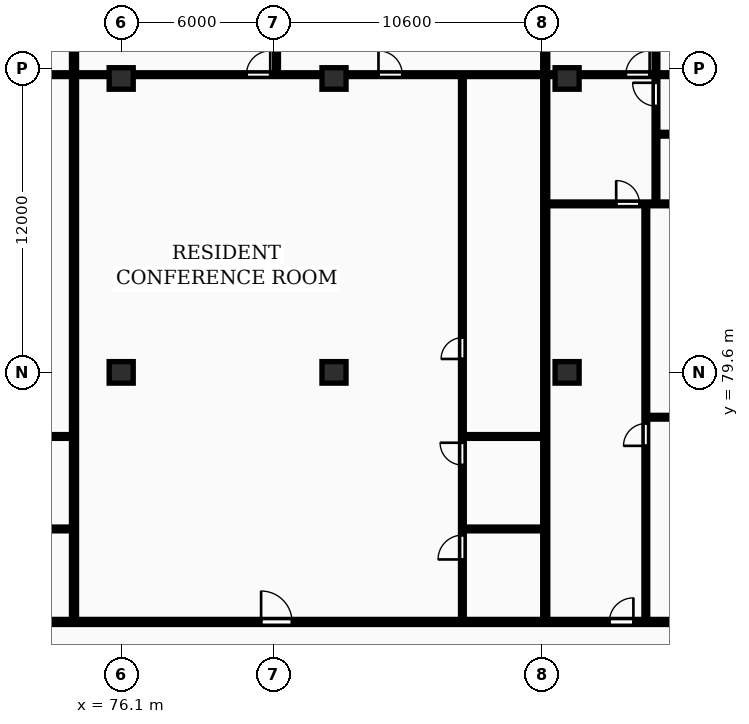
"""IFC4 building model, lengths in metres.
Left out: names, types, materials, properties, quantities, classifications, styles, units other than length and angle.
Written with IfcOpenShell. Run it as: python <this file> out.ifc"""

import sys

from ifc_helpers import new_model, si_unit, direction, frame, frame_2d, origin, origin_2d, place, context, subcontext, project, spatial, rectangle, extrude, element, fill, save


model = new_model("IFC4")
c1 = context("Model", 3, precision=1e-05, world=origin(), true_north=direction((0.0, 1.0)))
c2 = subcontext(c1, "Body", "Model", "MODEL_VIEW")
j1 = project(units=[si_unit("LENGTHUNIT", "METRE"), si_unit("PLANEANGLEUNIT", "RADIAN")], contexts=[c1])
p1 = place(None, origin())
s1 = spatial("IfcSite", under=j1, at=p1, CompositionType="ELEMENT")
p2 = place(p1, origin())
s2 = spatial("IfcBuilding", under=s1, at=p2, CompositionType="ELEMENT")
p3 = place(p2, frame((0.0, 0.0, 132.8)))
s3 = spatial("IfcBuildingStorey", under=s2, at=p3, CompositionType="ELEMENT", Elevation=132.8)
for number, where, z_axis, x_axis in (
    (1, (76.1, 79.6, 0.0), (0.0, 0.0, 1.0), (1.0, 0.0, 0.0)),
    (2, (76.1, 91.2, 0.0), (0.0, 0.0, 1.0), (1.0, 0.0, 0.0)),
    (3, (84.5, 79.6, 0.0), (0.0, 0.0, 1.0), (1.0, 0.0, 0.0)),
    (4, (84.5, 91.2, 0.0), (0.0, 0.0, 1.0), (1.0, 0.0, 0.0)),
    (5, (93.7, 79.6, 0.0), (0.0, 0.0, 1.0), (1.0, 0.0, 0.0)),
    (6, (93.7, 91.2, 0.0), (0.0, 0.0, 1.0), (1.0, 0.0, 0.0)),
):
    element("IfcColumn", number, at=place(p3, frame(where, z_axis=z_axis, x_axis=x_axis)), inside=s3, PredefinedType="COLUMN", context=c2, shape_type="SweptSolid", body=[
        extrude(rectangle(XDim=0.95, YDim=0.85, at=origin_2d()), origin(), (0.0, 0.0, 1.0), 3.25),
    ])
p4 = place(p3, frame((74.238, 69.83, 0.0), z_axis=(0.0, 0.0, 1.0), x_axis=(0.0, 1.0, 0.0)))
e7 = element("IfcWall", 7, at=p4, inside=s3, PredefinedType="PARTITIONING", context=c2, shape_type="SweptSolid", body=[
    extrude(rectangle(XDim=26.07, YDim=0.2, at=frame_2d((13.035, 0.0))), origin(), (0.0, 0.0, 1.0), 2.97),
])
for number, where, z_axis, x_axis in (
    (8, (70.798, 73.42, 0.0), (0.0, 0.0, 1.0), (1.0, 0.0, 0.0)),
    (9, (70.798, 77.07, 0.0), (0.0, 0.0, 1.0), (1.0, 0.0, 0.0)),
):
    element("IfcWall", number, at=place(p3, frame(where, z_axis=z_axis, x_axis=x_axis)), inside=s3, PredefinedType="PARTITIONING", context=c2, shape_type="SweptSolid", body=[
        extrude(rectangle(XDim=3.36, YDim=0.15, at=frame_2d((1.68, 0.0))), origin(), (0.0, 0.0, 1.0), 2.97),
    ])
p5 = place(p3, frame((57.68, 91.35, 0.0), z_axis=(0.0, 0.0, 1.0), x_axis=(1.0, 0.0, 0.0)))
e10 = element("IfcWall", 10, at=p5, inside=s3, PredefinedType="PARTITIONING", context=c2, shape_type="SweptSolid", body=[
    extrude(rectangle(XDim=16.478, YDim=0.15, at=frame_2d((8.239, 0.0))), origin(), (0.0, 0.0, 1.0), 2.663),
])
p6 = place(p5, frame((5.629, 0.0, 0.0)))
e11 = element("IfcOpeningElement", 11, at=p6, cuts=e10, PredefinedType="OPENING", context=c2, shape_type="SweptSolid", body=[
    extrude(rectangle(XDim=0.94, YDim=2.1, at=frame_2d((0.47, 1.05))), frame((0.0, 0.085, 0.0), z_axis=(0.0, -1.0, 0.0), x_axis=(1.0, 0.0, 0.0)), (0.0, 0.0, 1.0), 0.17),
])
p7 = place(p5, frame((7.645, 0.0, 0.0)))
e12 = element("IfcOpeningElement", 12, at=p7, cuts=e10, PredefinedType="OPENING", context=c2, shape_type="SweptSolid", body=[
    extrude(rectangle(XDim=0.94, YDim=2.1, at=frame_2d((0.47, 1.05))), frame((0.0, 0.085, 0.0), z_axis=(0.0, -1.0, 0.0), x_axis=(1.0, 0.0, 0.0)), (0.0, 0.0, 1.0), 0.17),
])
p8 = place(p3, frame((92.837, 69.83, 0.0), z_axis=(0.0, 0.0, 1.0), x_axis=(0.0, 1.0, 0.0)))
e13 = element("IfcWall", 13, at=p8, inside=s3, PredefinedType="PARTITIONING", context=c2, shape_type="SweptSolid", body=[
    extrude(rectangle(XDim=26.07, YDim=0.2, at=frame_2d((13.035, 0.0))), origin(), (0.0, 0.0, 1.0), 2.97),
])
for number, where, z_axis, x_axis in (
    (14, (89.627, 73.42, 0.0), (0.0, 0.0, 1.0), (1.0, 0.0, 0.0)),
    (15, (89.627, 77.07, 0.0), (0.0, 0.0, 1.0), (1.0, 0.0, 0.0)),
):
    element("IfcWall", number, at=place(p3, frame(where, z_axis=z_axis, x_axis=x_axis)), inside=s3, PredefinedType="PARTITIONING", context=c2, shape_type="SweptSolid", body=[
        extrude(rectangle(XDim=3.13, YDim=0.15, at=frame_2d((1.565, 0.0))), origin(), (0.0, 0.0, 1.0), 2.97),
    ])
p9 = place(p3, frame((89.567, 69.81, 0.0), z_axis=(0.0, 0.0, 1.0), x_axis=(0.0, 1.0, 0.0)))
e16 = element("IfcWall", 16, at=p9, inside=s3, PredefinedType="PARTITIONING", context=c2, shape_type="SweptSolid", body=[
    extrude(rectangle(XDim=21.48, YDim=0.15, at=frame_2d((10.74, 0.0))), origin(), (0.0, 0.0, 1.0), 2.97),
])
p10 = place(p9, frame((2.406, 0.0, 0.0)))
e17 = element("IfcOpeningElement", 17, at=p10, cuts=e16, PredefinedType="OPENING", context=c2, shape_type="SweptSolid", body=[
    extrude(rectangle(XDim=0.96, YDim=2.1, at=frame_2d((0.48, 1.05))), frame((0.0, 0.085, 0.0), z_axis=(0.0, -1.0, 0.0), x_axis=(1.0, 0.0, 0.0)), (0.0, 0.0, 1.0), 0.17),
])
p11 = place(p9, frame((6.133, 0.0, 0.0)))
e18 = element("IfcOpeningElement", 18, at=p11, cuts=e16, PredefinedType="OPENING", context=c2, shape_type="SweptSolid", body=[
    extrude(rectangle(XDim=0.88, YDim=2.06, at=frame_2d((0.44, 1.03))), frame((0.0, 0.085, 0.0), z_axis=(0.0, -1.0, 0.0), x_axis=(1.0, 0.0, 0.0)), (0.0, 0.0, 1.0), 0.17),
])
p12 = place(p9, frame((10.32, 0.0, 0.0)))
e19 = element("IfcOpeningElement", 19, at=p12, cuts=e16, PredefinedType="OPENING", context=c2, shape_type="SweptSolid", body=[
    extrude(rectangle(XDim=0.84, YDim=2.04, at=frame_2d((0.42, 1.02))), frame((0.0, 0.085, 0.0), z_axis=(0.0, -1.0, 0.0), x_axis=(1.0, 0.0, 0.0)), (0.0, 0.0, 1.0), 0.17),
])
p13 = place(p3, frame((82.232, 91.43, 0.0), z_axis=(0.0, 0.0, 1.0), x_axis=(0.0, 1.0, 0.0)))
e20 = element("IfcWall", 20, at=p13, inside=s3, PredefinedType="PARTITIONING", context=c2, shape_type="SweptSolid", body=[
    extrude(rectangle(XDim=4.47, YDim=0.15, at=frame_2d((2.235, 0.0))), origin(), (0.0, 0.0, 1.0), 2.97),
])
p14 = place(p3, frame((74.317, 91.35, 0.0), z_axis=(0.0, 0.0, 1.0), x_axis=(1.0, 0.0, 0.0)))
e21 = element("IfcWall", 21, at=p14, inside=s3, PredefinedType="PARTITIONING", context=c2, shape_type="SweptSolid", body=[
    extrude(rectangle(XDim=18.44, YDim=0.15, at=frame_2d((9.22, 0.0))), origin(), (0.0, 0.0, 1.0), 2.663),
])
p15 = place(p14, frame((6.725, 0.0, 0.0)))
e22 = element("IfcOpeningElement", 22, at=p15, cuts=e21, PredefinedType="OPENING", context=c2, shape_type="SweptSolid", body=[
    extrude(rectangle(XDim=0.94, YDim=2.1, at=frame_2d((0.47, 1.05))), frame((0.0, 0.085, 0.0), z_axis=(0.0, -1.0, 0.0), x_axis=(1.0, 0.0, 0.0)), (0.0, 0.0, 1.0), 0.17),
])
p16 = place(p14, frame((11.938, 0.0, 0.0)))
e23 = element("IfcOpeningElement", 23, at=p16, cuts=e21, PredefinedType="OPENING", context=c2, shape_type="SweptSolid", body=[
    extrude(rectangle(XDim=0.94, YDim=2.1, at=frame_2d((0.47, 1.05))), frame((0.0, 0.085, 0.0), z_axis=(0.0, -1.0, 0.0), x_axis=(1.0, 0.0, 0.0)), (0.0, 0.0, 1.0), 0.17),
])
p17 = place(p3, frame((96.867, 77.83, 0.0), z_axis=(0.0, 0.0, 1.0), x_axis=(1.0, 0.0, 0.0)))
e24 = element("IfcWall", 24, at=p17, inside=s3, PredefinedType="PARTITIONING", context=c2, shape_type="SweptSolid", body=[
    extrude(rectangle(XDim=16.177, YDim=0.15, at=frame_2d((8.089, 0.0))), origin(), (0.0, 0.0, 1.0), 2.97),
])
p18 = place(p17, frame((3.45, 0.0, 0.0)))
e25 = element("IfcOpeningElement", 25, at=p18, cuts=e24, PredefinedType="OPENING", context=c2, shape_type="SweptSolid", body=[
    extrude(rectangle(XDim=0.88, YDim=2.06, at=frame_2d((0.44, 1.03))), frame((0.0, 0.085, 0.0), z_axis=(0.0, -1.0, 0.0), x_axis=(1.0, 0.0, 0.0)), (0.0, 0.0, 1.0), 0.17),
])
p19 = place(p3, frame((96.808, 69.81, 0.0), z_axis=(0.0, 0.0, 1.0), x_axis=(0.0, 1.0, 0.0)))
e26 = element("IfcWall", 26, at=p19, inside=s3, PredefinedType="PARTITIONING", context=c2, shape_type="SweptSolid", body=[
    extrude(rectangle(XDim=16.4, YDim=0.15, at=frame_2d((8.2, 0.0))), origin(), (0.0, 0.0, 1.0), 2.97),
])
p20 = place(p19, frame((6.89, 0.0, 0.0)))
e27 = element("IfcOpeningElement", 27, at=p20, cuts=e26, PredefinedType="OPENING", context=c2, shape_type="SweptSolid", body=[
    extrude(rectangle(XDim=0.88, YDim=2.06, at=frame_2d((0.44, 1.03))), frame((0.0, 0.085, 0.0), z_axis=(0.0, -1.0, 0.0), x_axis=(1.0, 0.0, 0.0)), (0.0, 0.0, 1.0), 0.17),
])
p21 = place(p3, frame((97.208, 86.29, 0.0), z_axis=(0.0, 0.0, 1.0), x_axis=(0.0, 1.0, 0.0)))
e28 = element("IfcWall", 28, at=p21, inside=s3, PredefinedType="PARTITIONING", context=c2, shape_type="SweptSolid", body=[
    extrude(rectangle(XDim=9.61, YDim=0.15, at=frame_2d((4.805, 0.0))), origin(), (0.0, 0.0, 1.0), 2.97),
])
p22 = place(p21, frame((3.82, 0.0, 0.0)))
e29 = element("IfcOpeningElement", 29, at=p22, cuts=e28, PredefinedType="OPENING", context=c2, shape_type="SweptSolid", body=[
    extrude(rectangle(XDim=0.92, YDim=2.08, at=frame_2d((0.46, 1.04))), frame((0.0, 0.085, 0.0), z_axis=(0.0, -1.0, 0.0), x_axis=(1.0, 0.0, 0.0)), (0.0, 0.0, 1.0), 0.17),
])
p23 = place(p3, frame((97.248, 89.0, 0.0), z_axis=(0.0, 0.0, 1.0), x_axis=(1.0, 0.0, 0.0)))
e30 = element("IfcWall", 30, at=p23, inside=s3, PredefinedType="PARTITIONING", context=c2, shape_type="SweptSolid", body=[
    extrude(rectangle(XDim=15.797, YDim=0.15, at=frame_2d((7.899, 0.0))), origin(), (0.0, 0.0, 1.0), 2.97),
])
p24 = place(p23, frame((1.191, 0.0, 0.0)))
e31 = element("IfcOpeningElement", 31, at=p24, cuts=e30, PredefinedType="OPENING", context=c2, shape_type="SweptSolid", body=[
    extrude(rectangle(XDim=0.84, YDim=2.04, at=frame_2d((0.42, 1.02))), frame((0.0, 0.085, 0.0), z_axis=(0.0, -1.0, 0.0), x_axis=(1.0, 0.0, 0.0)), (0.0, 0.0, 1.0), 0.17),
])
p25 = place(p23, frame((7.479, 0.0, 0.0)))
e32 = element("IfcOpeningElement", 32, at=p25, cuts=e30, PredefinedType="OPENING", context=c2, shape_type="SweptSolid", body=[
    extrude(rectangle(XDim=0.84, YDim=2.04, at=frame_2d((0.42, 1.02))), frame((0.0, 0.085, 0.0), z_axis=(0.0, -1.0, 0.0), x_axis=(1.0, 0.0, 0.0)), (0.0, 0.0, 1.0), 0.17),
])
p26 = place(p23, frame((11.798, 0.0, 0.0)))
e33 = element("IfcOpeningElement", 33, at=p26, cuts=e30, PredefinedType="OPENING", context=c2, shape_type="SweptSolid", body=[
    extrude(rectangle(XDim=0.84, YDim=2.04, at=frame_2d((0.42, 1.02))), frame((0.0, 0.085, 0.0), z_axis=(0.0, -1.0, 0.0), x_axis=(1.0, 0.0, 0.0)), (0.0, 0.0, 1.0), 0.17),
])
p27 = place(p3, frame((92.917, 86.25, 0.0), z_axis=(0.0, 0.0, 1.0), x_axis=(1.0, 0.0, 0.0)))
e34 = element("IfcWall", 34, at=p27, inside=s3, PredefinedType="PARTITIONING", context=c2, shape_type="SweptSolid", body=[
    extrude(rectangle(XDim=20.127, YDim=0.15, at=frame_2d((10.064, 0.0))), origin(), (0.0, 0.0, 1.0), 2.97),
])
p28 = place(p27, frame((2.72, 0.0, 0.0)))
e35 = element("IfcOpeningElement", 35, at=p28, cuts=e34, PredefinedType="OPENING", context=c2, shape_type="SweptSolid", body=[
    extrude(rectangle(XDim=0.92, YDim=2.08, at=frame_2d((0.46, 1.04))), frame((0.0, 0.085, 0.0), z_axis=(0.0, -1.0, 0.0), x_axis=(1.0, 0.0, 0.0)), (0.0, 0.0, 1.0), 0.17),
])
p29 = place(p3, frame((92.917, 91.35, 0.0), z_axis=(0.0, 0.0, 1.0), x_axis=(1.0, 0.0, 0.0)))
e36 = element("IfcWall", 36, at=p29, inside=s3, PredefinedType="PARTITIONING", context=c2, shape_type="SweptSolid", body=[
    extrude(rectangle(XDim=15.877, YDim=0.15, at=frame_2d((7.939, 0.0))), origin(), (0.0, 0.0, 1.0), 2.663),
])
p30 = place(p29, frame((3.1, 0.0, 0.0)))
e37 = element("IfcOpeningElement", 37, at=p30, cuts=e36, PredefinedType="OPENING", context=c2, shape_type="SweptSolid", body=[
    extrude(rectangle(XDim=0.94, YDim=2.1, at=frame_2d((0.47, 1.05))), frame((0.0, 0.085, 0.0), z_axis=(0.0, -1.0, 0.0), x_axis=(1.0, 0.0, 0.0)), (0.0, 0.0, 1.0), 0.17),
])
p31 = place(p29, frame((7.373, 0.0, 0.0)))
e38 = element("IfcOpeningElement", 38, at=p31, cuts=e36, PredefinedType="OPENING", context=c2, shape_type="SweptSolid", body=[
    extrude(rectangle(XDim=0.88, YDim=2.06, at=frame_2d((0.44, 1.03))), frame((0.0, 0.085, 0.0), z_axis=(0.0, -1.0, 0.0), x_axis=(1.0, 0.0, 0.0)), (0.0, 0.0, 1.0), 0.17),
])
p32 = place(p29, frame((11.646, 0.0, 0.0)))
e39 = element("IfcOpeningElement", 39, at=p32, cuts=e36, PredefinedType="OPENING", context=c2, shape_type="SweptSolid", body=[
    extrude(rectangle(XDim=0.88, YDim=2.06, at=frame_2d((0.44, 1.03))), frame((0.0, 0.085, 0.0), z_axis=(0.0, -1.0, 0.0), x_axis=(1.0, 0.0, 0.0)), (0.0, 0.0, 1.0), 0.17),
])
p33 = place(p3, frame((57.6, 69.75, 0.0), z_axis=(0.0, 0.0, 1.0), x_axis=(1.0, 0.0, 0.0)))
e40 = element("IfcWall", 40, at=p33, inside=s3, PredefinedType="PARTITIONING", context=c2, shape_type="SweptSolid", body=[
    extrude(rectangle(XDim=73.0, YDim=0.2, at=frame_2d((36.5, 0.0))), origin(), (0.0, 0.0, 1.0), 2.97),
])
p34 = place(p33, frame((6.629, 0.0, 0.0)))
e41 = element("IfcOpeningElement", 41, at=p34, cuts=e40, PredefinedType="OPENING", context=c2, shape_type="SweptSolid", body=[
    extrude(rectangle(XDim=1.22, YDim=2.18, at=frame_2d((0.61, 1.09))), frame((0.0, 0.11, 0.0), z_axis=(0.0, -1.0, 0.0), x_axis=(1.0, 0.0, 0.0)), (0.0, 0.0, 1.0), 0.22),
])
p35 = place(p33, frame((24.022, 0.0, 0.0)))
e42 = element("IfcOpeningElement", 42, at=p35, cuts=e40, PredefinedType="OPENING", context=c2, shape_type="SweptSolid", body=[
    extrude(rectangle(XDim=1.22, YDim=2.18, at=frame_2d((0.61, 1.09))), frame((0.0, 0.11, 0.0), z_axis=(0.0, -1.0, 0.0), x_axis=(1.0, 0.0, 0.0)), (0.0, 0.0, 1.0), 0.22),
])
p36 = place(p33, frame((37.768, 0.0, 0.0)))
e43 = element("IfcOpeningElement", 43, at=p36, cuts=e40, PredefinedType="OPENING", context=c2, shape_type="SweptSolid", body=[
    extrude(rectangle(XDim=0.95, YDim=2.15, at=frame_2d((0.475, 1.075))), frame((0.0, 0.11, 0.0), z_axis=(0.0, -1.0, 0.0), x_axis=(1.0, 0.0, 0.0)), (0.0, 0.0, 1.0), 0.22),
])
p37 = place(p33, frame((57.57, 0.0, 0.0)))
e44 = element("IfcOpeningElement", 44, at=p37, cuts=e40, PredefinedType="OPENING", context=c2, shape_type="SweptSolid", body=[
    extrude(rectangle(XDim=0.95, YDim=2.15, at=frame_2d((0.475, 1.075))), frame((0.0, 0.11, 0.0), z_axis=(0.0, -1.0, 0.0), x_axis=(1.0, 0.0, 0.0)), (0.0, 0.0, 1.0), 0.22),
])
p38 = place(p10, origin())
e45 = element("IfcDoor", 45, at=p38, inside=s3, OperationType="SINGLE_SWING_LEFT", PredefinedType="DOOR", context=c2, shape_type="SweptSolid", body=[
    extrude(rectangle(XDim=0.96, YDim=2.1, at=frame_2d((0.48, 1.05))), frame((0.0, 0.025, 0.0), z_axis=(0.0, -1.0, 0.0), x_axis=(1.0, 0.0, 0.0)), (0.0, 0.0, 1.0), 0.05),
])
fill(e17, e45)
p39 = place(p11, origin())
e46 = element("IfcDoor", 46, at=p39, inside=s3, OperationType="SINGLE_SWING_RIGHT", PredefinedType="DOOR", context=c2, shape_type="SweptSolid", body=[
    extrude(rectangle(XDim=0.88, YDim=2.06, at=frame_2d((0.44, 1.03))), frame((0.0, 0.025, 0.0), z_axis=(0.0, -1.0, 0.0), x_axis=(1.0, 0.0, 0.0)), (0.0, 0.0, 1.0), 0.05),
])
fill(e18, e46)
p40 = place(p12, origin())
e47 = element("IfcDoor", 47, at=p40, inside=s3, OperationType="SINGLE_SWING_LEFT", PredefinedType="DOOR", context=c2, shape_type="SweptSolid", body=[
    extrude(rectangle(XDim=0.84, YDim=2.04, at=frame_2d((0.42, 1.02))), frame((0.0, 0.025, 0.0), z_axis=(0.0, -1.0, 0.0), x_axis=(1.0, 0.0, 0.0)), (0.0, 0.0, 1.0), 0.05),
])
fill(e19, e47)
p41 = place(p15, origin())
e48 = element("IfcDoor", 48, at=p41, inside=s3, OperationType="SINGLE_SWING_RIGHT", PredefinedType="DOOR", context=c2, shape_type="SweptSolid", body=[
    extrude(rectangle(XDim=0.94, YDim=2.1, at=frame_2d((0.47, 1.05))), frame((0.0, 0.025, 0.0), z_axis=(0.0, -1.0, 0.0), x_axis=(1.0, 0.0, 0.0)), (0.0, 0.0, 1.0), 0.05),
])
fill(e22, e48)
p42 = place(p16, origin())
e49 = element("IfcDoor", 49, at=p42, inside=s3, OperationType="SINGLE_SWING_LEFT", PredefinedType="DOOR", context=c2, shape_type="SweptSolid", body=[
    extrude(rectangle(XDim=0.94, YDim=2.1, at=frame_2d((0.47, 1.05))), frame((0.0, 0.025, 0.0), z_axis=(0.0, -1.0, 0.0), x_axis=(1.0, 0.0, 0.0)), (0.0, 0.0, 1.0), 0.05),
])
fill(e23, e49)
p43 = place(p20, origin())
e50 = element("IfcDoor", 50, at=p43, inside=s3, OperationType="SINGLE_SWING_LEFT", PredefinedType="DOOR", context=c2, shape_type="SweptSolid", body=[
    extrude(rectangle(XDim=0.88, YDim=2.06, at=frame_2d((0.44, 1.03))), frame((0.0, 0.025, 0.0), z_axis=(0.0, -1.0, 0.0), x_axis=(1.0, 0.0, 0.0)), (0.0, 0.0, 1.0), 0.05),
])
fill(e27, e50)
p44 = place(p22, origin())
e51 = element("IfcDoor", 51, at=p44, inside=s3, OperationType="SINGLE_SWING_RIGHT", PredefinedType="DOOR", context=c2, shape_type="SweptSolid", body=[
    extrude(rectangle(XDim=0.92, YDim=2.08, at=frame_2d((0.46, 1.04))), frame((0.0, 0.025, 0.0), z_axis=(0.0, -1.0, 0.0), x_axis=(1.0, 0.0, 0.0)), (0.0, 0.0, 1.0), 0.05),
])
fill(e29, e51)
p45 = place(p28, origin())
e52 = element("IfcDoor", 52, at=p45, inside=s3, OperationType="SINGLE_SWING_LEFT", PredefinedType="DOOR", context=c2, shape_type="SweptSolid", body=[
    extrude(rectangle(XDim=0.92, YDim=2.08, at=frame_2d((0.46, 1.04))), frame((0.0, 0.025, 0.0), z_axis=(0.0, -1.0, 0.0), x_axis=(1.0, 0.0, 0.0)), (0.0, 0.0, 1.0), 0.05),
])
fill(e35, e52)
p46 = place(p30, origin())
e53 = element("IfcDoor", 53, at=p46, inside=s3, OperationType="SINGLE_SWING_RIGHT", PredefinedType="DOOR", context=c2, shape_type="SweptSolid", body=[
    extrude(rectangle(XDim=0.94, YDim=2.1, at=frame_2d((0.47, 1.05))), frame((0.0, 0.025, 0.0), z_axis=(0.0, -1.0, 0.0), x_axis=(1.0, 0.0, 0.0)), (0.0, 0.0, 1.0), 0.05),
])
fill(e37, e53)
p47 = place(p35, origin())
e54 = element("IfcDoor", 54, at=p47, inside=s3, OperationType="SINGLE_SWING_LEFT", PredefinedType="DOOR", context=c2, shape_type="SweptSolid", body=[
    extrude(rectangle(XDim=1.22, YDim=2.18, at=frame_2d((0.61, 1.09))), frame((0.0, 0.025, 0.0), z_axis=(0.0, -1.0, 0.0), x_axis=(1.0, 0.0, 0.0)), (0.0, 0.0, 1.0), 0.05),
])
fill(e42, e54)
p48 = place(p36, origin())
e55 = element("IfcDoor", 55, at=p48, inside=s3, OperationType="SINGLE_SWING_RIGHT", PredefinedType="DOOR", context=c2, shape_type="SweptSolid", body=[
    extrude(rectangle(XDim=0.95, YDim=2.15, at=frame_2d((0.475, 1.075))), frame((0.0, 0.025, 0.0), z_axis=(0.0, -1.0, 0.0), x_axis=(1.0, 0.0, 0.0)), (0.0, 0.0, 1.0), 0.05),
])
fill(e43, e55)
save(model, sys.argv[1])
